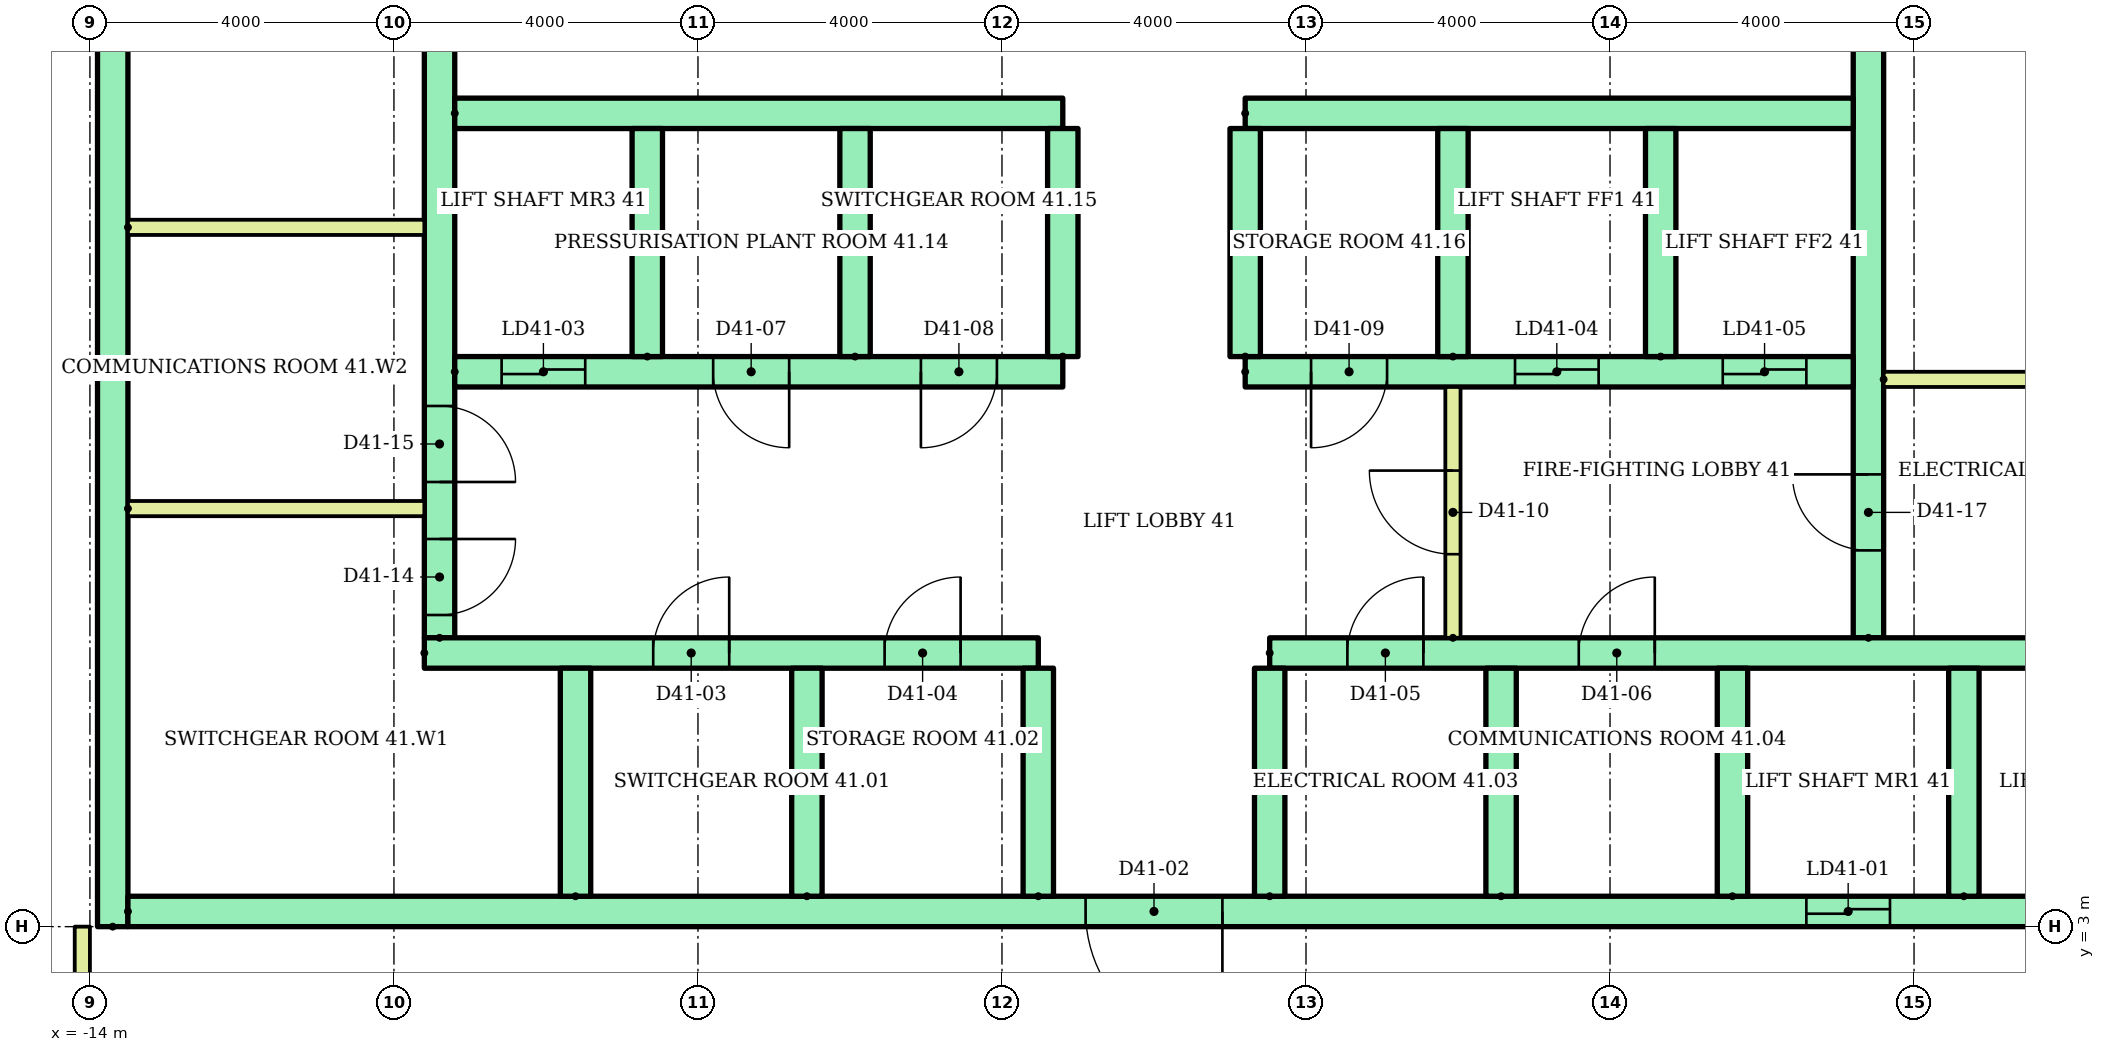
"""IFC4 building model, lengths in metres.
Left out: names, types, materials, properties, quantities, classifications, styles, units other than length and angle.
Written with IfcOpenShell. Run it as: python <this file> out.ifc"""

import sys

from ifc_helpers import new_model, si_unit, direction, frame, frame_2d, origin, place, context, subcontext, project, spatial, rectangle, extrude, element, fill, save


model = new_model("IFC4")
c1 = context("Model", 3, precision=1e-05, world=origin(), true_north=direction((0.0, 1.0)))
c2 = subcontext(c1, "Body", "Model", "MODEL_VIEW")
j1 = project(units=[si_unit("LENGTHUNIT", "METRE"), si_unit("PLANEANGLEUNIT", "RADIAN")], contexts=[c1])
p1 = place(None, origin())
s1 = spatial("IfcSite", under=j1, at=p1, CompositionType="ELEMENT")
p2 = place(p1, origin())
s2 = spatial("IfcBuilding", under=s1, at=p2, CompositionType="ELEMENT")
p3 = place(p2, frame((0.0, 0.0, 161.4)))
s3 = spatial("IfcBuildingStorey", under=s2, at=p3, CompositionType="ELEMENT", Elevation=161.4)
p4 = place(p3, frame((-13.7, 3.0, 0.0), z_axis=(0.0, 0.0, 1.0), x_axis=(0.0, 1.0, 0.0)))
e1 = element("IfcWall", 1, at=p4, inside=s3, PredefinedType="SHEAR", context=c2, shape_type="SweptSolid", body=[
    extrude(rectangle(XDim=17.0, YDim=0.4, at=frame_2d((8.5, 0.0))), origin(), (0.0, 0.0, 1.0), 3.62),
])
p5 = place(p3, frame((-9.4, 6.8, 0.0), z_axis=(0.0, 0.0, 1.0), x_axis=(0.0, 1.0, 0.0)))
e2 = element("IfcWall", 2, at=p5, inside=s3, PredefinedType="SHEAR", context=c2, shape_type="SweptSolid", body=[
    extrude(rectangle(XDim=12.7, YDim=0.4, at=frame_2d((6.35, 0.0))), origin(), (0.0, 0.0, 1.0), 3.62),
])
p6 = place(p5, frame((0.3, 0.0, 0.0)))
e3 = element("IfcOpeningElement", 3, at=p6, cuts=e2, PredefinedType="OPENING", context=c2, shape_type="SweptSolid", body=[
    extrude(rectangle(XDim=1.0, YDim=2.1, at=frame_2d((0.5, 1.05))), frame((0.0, 0.21, 0.0), z_axis=(0.0, -1.0, 0.0), x_axis=(1.0, 0.0, 0.0)), (0.0, 0.0, 1.0), 0.42),
])
p7 = place(p5, frame((2.05, 0.0, 0.0)))
e4 = element("IfcOpeningElement", 4, at=p7, cuts=e2, PredefinedType="OPENING", context=c2, shape_type="SweptSolid", body=[
    extrude(rectangle(XDim=1.0, YDim=2.1, at=frame_2d((0.5, 1.05))), frame((0.0, 0.21, 0.0), z_axis=(0.0, -1.0, 0.0), x_axis=(1.0, 0.0, 0.0)), (0.0, 0.0, 1.0), 0.42),
])
p8 = place(p5, frame((7.925, 0.0, 0.0)))
e5 = element("IfcOpeningElement", 5, at=p8, cuts=e2, PredefinedType="OPENING", context=c2, shape_type="SweptSolid", body=[
    extrude(rectangle(XDim=1.0, YDim=2.1, at=frame_2d((0.5, 1.05))), frame((0.0, 0.21, 0.0), z_axis=(0.0, -1.0, 0.0), x_axis=(1.0, 0.0, 0.0)), (0.0, 0.0, 1.0), 0.42),
])
p9 = place(p3, frame((9.4, 6.8, 0.0), z_axis=(0.0, 0.0, 1.0), x_axis=(0.0, 1.0, 0.0)))
e6 = element("IfcWall", 6, at=p9, inside=s3, PredefinedType="SHEAR", context=c2, shape_type="SweptSolid", body=[
    extrude(rectangle(XDim=12.7, YDim=0.4, at=frame_2d((6.35, 0.0))), origin(), (0.0, 0.0, 1.0), 3.62),
])
p10 = place(p9, frame((1.15, 0.0, 0.0)))
e7 = element("IfcOpeningElement", 7, at=p10, cuts=e6, PredefinedType="OPENING", context=c2, shape_type="SweptSolid", body=[
    extrude(rectangle(XDim=1.0, YDim=2.1, at=frame_2d((0.5, 1.05))), frame((0.0, 0.21, 0.0), z_axis=(0.0, -1.0, 0.0), x_axis=(1.0, 0.0, 0.0)), (0.0, 0.0, 1.0), 0.42),
])
p11 = place(p9, frame((7.925, 0.0, 0.0)))
e8 = element("IfcOpeningElement", 8, at=p11, cuts=e6, PredefinedType="OPENING", context=c2, shape_type="SweptSolid", body=[
    extrude(rectangle(XDim=1.0, YDim=2.1, at=frame_2d((0.5, 1.05))), frame((0.0, 0.21, 0.0), z_axis=(0.0, -1.0, 0.0), x_axis=(1.0, 0.0, 0.0)), (0.0, 0.0, 1.0), 0.42),
])
p12 = place(p3, frame((-13.5, 3.2, 0.0)))
e9 = element("IfcWall", 9, at=p12, inside=s3, PredefinedType="SHEAR", context=c2, shape_type="SweptSolid", body=[
    extrude(rectangle(XDim=27.0, YDim=0.4, at=frame_2d((13.5, 0.0))), origin(), (0.0, 0.0, 1.0), 3.62),
])
p13 = place(p12, frame((22.083, 0.0, 0.0)))
e10 = element("IfcOpeningElement", 10, at=p13, cuts=e9, PredefinedType="OPENING", context=c2, shape_type="SweptSolid", body=[
    extrude(rectangle(XDim=1.1, YDim=2.1, at=frame_2d((0.55, 1.05))), frame((0.0, 0.21, 0.0), z_axis=(0.0, -1.0, 0.0), x_axis=(1.0, 0.0, 0.0)), (0.0, 0.0, 1.0), 0.42),
])
p14 = place(p12, frame((25.128, 0.0, 0.0)))
e11 = element("IfcOpeningElement", 11, at=p14, cuts=e9, PredefinedType="OPENING", context=c2, shape_type="SweptSolid", body=[
    extrude(rectangle(XDim=1.1, YDim=2.1, at=frame_2d((0.55, 1.05))), frame((0.0, 0.21, 0.0), z_axis=(0.0, -1.0, 0.0), x_axis=(1.0, 0.0, 0.0)), (0.0, 0.0, 1.0), 0.42),
])
p15 = place(p12, frame((12.6, 0.0, 0.0)))
e12 = element("IfcOpeningElement", 12, at=p15, cuts=e9, PredefinedType="OPENING", context=c2, shape_type="SweptSolid", body=[
    extrude(rectangle(XDim=1.8, YDim=2.1, at=frame_2d((0.9, 1.05))), frame((0.0, 0.21, 0.0), z_axis=(0.0, -1.0, 0.0), x_axis=(1.0, 0.0, 0.0)), (0.0, 0.0, 1.0), 0.42),
])
p16 = place(p3, frame((-9.6, 6.6, 0.0)))
e13 = element("IfcWall", 13, at=p16, inside=s3, PredefinedType="SHEAR", context=c2, shape_type="SweptSolid", body=[
    extrude(rectangle(XDim=8.078, YDim=0.4, at=frame_2d((4.039, 0.0))), origin(), (0.0, 0.0, 1.0), 3.62),
])
p17 = place(p16, frame((3.011, 0.0, 0.0)))
e14 = element("IfcOpeningElement", 14, at=p17, cuts=e13, PredefinedType="OPENING", context=c2, shape_type="SweptSolid", body=[
    extrude(rectangle(XDim=1.0, YDim=2.1, at=frame_2d((0.5, 1.05))), frame((0.0, 0.21, 0.0), z_axis=(0.0, -1.0, 0.0), x_axis=(1.0, 0.0, 0.0)), (0.0, 0.0, 1.0), 0.42),
])
p18 = place(p16, frame((6.056, 0.0, 0.0)))
e15 = element("IfcOpeningElement", 15, at=p18, cuts=e13, PredefinedType="OPENING", context=c2, shape_type="SweptSolid", body=[
    extrude(rectangle(XDim=1.0, YDim=2.1, at=frame_2d((0.5, 1.05))), frame((0.0, 0.21, 0.0), z_axis=(0.0, -1.0, 0.0), x_axis=(1.0, 0.0, 0.0)), (0.0, 0.0, 1.0), 0.42),
])
p19 = place(p3, frame((1.522, 6.6, 0.0)))
e16 = element("IfcWall", 16, at=p19, inside=s3, PredefinedType="SHEAR", context=c2, shape_type="SweptSolid", body=[
    extrude(rectangle(XDim=11.978, YDim=0.4, at=frame_2d((5.989, 0.0))), origin(), (0.0, 0.0, 1.0), 3.62),
])
p20 = place(p19, frame((1.022, 0.0, 0.0)))
e17 = element("IfcOpeningElement", 17, at=p20, cuts=e16, PredefinedType="OPENING", context=c2, shape_type="SweptSolid", body=[
    extrude(rectangle(XDim=1.0, YDim=2.1, at=frame_2d((0.5, 1.05))), frame((0.0, 0.21, 0.0), z_axis=(0.0, -1.0, 0.0), x_axis=(1.0, 0.0, 0.0)), (0.0, 0.0, 1.0), 0.42),
])
p21 = place(p19, frame((4.067, 0.0, 0.0)))
e18 = element("IfcOpeningElement", 18, at=p21, cuts=e16, PredefinedType="OPENING", context=c2, shape_type="SweptSolid", body=[
    extrude(rectangle(XDim=1.0, YDim=2.1, at=frame_2d((0.5, 1.05))), frame((0.0, 0.21, 0.0), z_axis=(0.0, -1.0, 0.0), x_axis=(1.0, 0.0, 0.0)), (0.0, 0.0, 1.0), 0.42),
])
for number, where, z_axis, x_axis in (
    (19, (-7.611, 3.4, 0.0), (0.0, 0.0, 1.0), (0.0, 1.0, 0.0)),
    (20, (-4.567, 3.4, 0.0), (0.0, 0.0, 1.0), (0.0, 1.0, 0.0)),
    (21, (-1.522, 3.4, 0.0), (0.0, 0.0, 1.0), (0.0, 1.0, 0.0)),
    (22, (1.522, 3.4, 0.0), (0.0, 0.0, 1.0), (0.0, 1.0, 0.0)),
    (23, (4.567, 3.4, 0.0), (0.0, 0.0, 1.0), (0.0, 1.0, 0.0)),
    (24, (7.611, 3.4, 0.0), (0.0, 0.0, 1.0), (0.0, 1.0, 0.0)),
    (25, (10.656, 3.4, 0.0), (0.0, 0.0, 1.0), (0.0, 1.0, 0.0)),
):
    element("IfcWall", number, at=place(p3, frame(where, z_axis=z_axis, x_axis=x_axis)), inside=s3, PredefinedType="SHEAR", context=c2, shape_type="SweptSolid", body=[
        extrude(rectangle(XDim=3.0, YDim=0.4, at=frame_2d((1.5, 0.0))), origin(), (0.0, 0.0, 1.0), 3.62),
    ])
p22 = place(p3, frame((-9.2, 10.3, 0.0)))
e26 = element("IfcWall", 26, at=p22, inside=s3, PredefinedType="SHEAR", context=c2, shape_type="SweptSolid", body=[
    extrude(rectangle(XDim=8.0, YDim=0.4, at=frame_2d((4.0, 0.0))), origin(), (0.0, 0.0, 1.0), 3.62),
])
p23 = place(p22, frame((0.617, 0.0, 0.0)))
e27 = element("IfcOpeningElement", 27, at=p23, cuts=e26, PredefinedType="OPENING", context=c2, shape_type="SweptSolid", body=[
    extrude(rectangle(XDim=1.1, YDim=2.1, at=frame_2d((0.55, 1.05))), frame((0.0, 0.21, 0.0), z_axis=(0.0, -1.0, 0.0), x_axis=(1.0, 0.0, 0.0)), (0.0, 0.0, 1.0), 0.42),
])
p24 = place(p22, frame((3.4, 0.0, 0.0)))
e28 = element("IfcOpeningElement", 28, at=p24, cuts=e26, PredefinedType="OPENING", context=c2, shape_type="SweptSolid", body=[
    extrude(rectangle(XDim=1.0, YDim=2.1, at=frame_2d((0.5, 1.05))), frame((0.0, 0.21, 0.0), z_axis=(0.0, -1.0, 0.0), x_axis=(1.0, 0.0, 0.0)), (0.0, 0.0, 1.0), 0.42),
])
p25 = place(p22, frame((6.133, 0.0, 0.0)))
e29 = element("IfcOpeningElement", 29, at=p25, cuts=e26, PredefinedType="OPENING", context=c2, shape_type="SweptSolid", body=[
    extrude(rectangle(XDim=1.0, YDim=2.1, at=frame_2d((0.5, 1.05))), frame((0.0, 0.21, 0.0), z_axis=(0.0, -1.0, 0.0), x_axis=(1.0, 0.0, 0.0)), (0.0, 0.0, 1.0), 0.42),
])
p26 = place(p3, frame((-9.2, 13.7, 0.0)))
e30 = element("IfcWall", 30, at=p26, inside=s3, PredefinedType="SHEAR", context=c2, shape_type="SweptSolid", body=[
    extrude(rectangle(XDim=8.0, YDim=0.4, at=frame_2d((4.0, 0.0))), origin(), (0.0, 0.0, 1.0), 3.62),
])
p27 = place(p3, frame((1.2, 10.3, 0.0)))
e31 = element("IfcWall", 31, at=p27, inside=s3, PredefinedType="SHEAR", context=c2, shape_type="SweptSolid", body=[
    extrude(rectangle(XDim=8.0, YDim=0.4, at=frame_2d((4.0, 0.0))), origin(), (0.0, 0.0, 1.0), 3.62),
])
p28 = place(p27, frame((3.55, 0.0, 0.0)))
e32 = element("IfcOpeningElement", 32, at=p28, cuts=e31, PredefinedType="OPENING", context=c2, shape_type="SweptSolid", body=[
    extrude(rectangle(XDim=1.1, YDim=2.1, at=frame_2d((0.55, 1.05))), frame((0.0, 0.21, 0.0), z_axis=(0.0, -1.0, 0.0), x_axis=(1.0, 0.0, 0.0)), (0.0, 0.0, 1.0), 0.42),
])
p29 = place(p27, frame((6.283, 0.0, 0.0)))
e33 = element("IfcOpeningElement", 33, at=p29, cuts=e31, PredefinedType="OPENING", context=c2, shape_type="SweptSolid", body=[
    extrude(rectangle(XDim=1.1, YDim=2.1, at=frame_2d((0.55, 1.05))), frame((0.0, 0.21, 0.0), z_axis=(0.0, -1.0, 0.0), x_axis=(1.0, 0.0, 0.0)), (0.0, 0.0, 1.0), 0.42),
])
p30 = place(p27, frame((0.867, 0.0, 0.0)))
e34 = element("IfcOpeningElement", 34, at=p30, cuts=e31, PredefinedType="OPENING", context=c2, shape_type="SweptSolid", body=[
    extrude(rectangle(XDim=1.0, YDim=2.1, at=frame_2d((0.5, 1.05))), frame((0.0, 0.21, 0.0), z_axis=(0.0, -1.0, 0.0), x_axis=(1.0, 0.0, 0.0)), (0.0, 0.0, 1.0), 0.42),
])
p31 = place(p3, frame((1.2, 13.7, 0.0)))
e35 = element("IfcWall", 35, at=p31, inside=s3, PredefinedType="SHEAR", context=c2, shape_type="SweptSolid", body=[
    extrude(rectangle(XDim=8.0, YDim=0.4, at=frame_2d((4.0, 0.0))), origin(), (0.0, 0.0, 1.0), 3.62),
])
for number, where, z_axis, x_axis in (
    (36, (-6.667, 10.5, 0.0), (0.0, 0.0, 1.0), (0.0, 1.0, 0.0)),
    (37, (-3.933, 10.5, 0.0), (0.0, 0.0, 1.0), (0.0, 1.0, 0.0)),
    (38, (-1.2, 10.5, 0.0), (0.0, 0.0, 1.0), (0.0, 1.0, 0.0)),
    (39, (1.2, 10.5, 0.0), (0.0, 0.0, 1.0), (0.0, 1.0, 0.0)),
    (40, (3.933, 10.5, 0.0), (0.0, 0.0, 1.0), (0.0, 1.0, 0.0)),
    (41, (6.667, 10.5, 0.0), (0.0, 0.0, 1.0), (0.0, 1.0, 0.0)),
):
    element("IfcWall", number, at=place(p3, frame(where, z_axis=z_axis, x_axis=x_axis)), inside=s3, PredefinedType="SHEAR", context=c2, shape_type="SweptSolid", body=[
        extrude(rectangle(XDim=3.0, YDim=0.4, at=frame_2d((1.5, 0.0))), origin(), (0.0, 0.0, 1.0), 3.62),
    ])
p32 = place(p3, frame((3.933, 6.8, 0.0), z_axis=(0.0, 0.0, 1.0), x_axis=(0.0, 1.0, 0.0)))
e42 = element("IfcWall", 42, at=p32, inside=s3, PredefinedType="PARTITIONING", context=c2, shape_type="SweptSolid", body=[
    extrude(rectangle(XDim=3.3, YDim=0.2, at=frame_2d((1.65, 0.0))), origin(), (0.0, 0.0, 1.0), 3.62),
])
p33 = place(p32, frame((1.1, 0.0, 0.0)))
e43 = element("IfcOpeningElement", 43, at=p33, cuts=e42, PredefinedType="OPENING", context=c2, shape_type="SweptSolid", body=[
    extrude(rectangle(XDim=1.1, YDim=2.1, at=frame_2d((0.55, 1.05))), frame((0.0, 0.11, 0.0), z_axis=(0.0, -1.0, 0.0), x_axis=(1.0, 0.0, 0.0)), (0.0, 0.0, 1.0), 0.22),
])
for number, where in (
    (44, (-13.5, 8.5, 0.0)),
    (45, (-13.5, 12.2, 0.0)),
    (46, (9.6, 10.2, 0.0)),
):
    element("IfcWall", number, at=place(p3, frame(where)), inside=s3, PredefinedType="PARTITIONING", context=c2, shape_type="SweptSolid", body=[
        extrude(rectangle(XDim=3.9, YDim=0.2, at=frame_2d((1.95, 0.0))), origin(), (0.0, 0.0, 1.0), 3.62),
    ])
p34 = place(p3, frame((-14.1, 1.5, 0.0), z_axis=(0.0, 0.0, 1.0), x_axis=(0.0, 1.0, 0.0)))
e47 = element("IfcWall", 47, at=p34, inside=s3, PredefinedType="PARTITIONING", context=c2, shape_type="SweptSolid", body=[
    extrude(rectangle(XDim=1.5, YDim=0.2, at=frame_2d((0.75, 0.0))), origin(), (0.0, 0.0, 1.0), 3.62),
])
p35 = place(p13, origin())
e48 = element("IfcDoor", 48, at=p35, inside=s3, OperationType="SLIDING_TO_LEFT", PredefinedType="DOOR", context=c2, shape_type="SweptSolid", body=[
    extrude(rectangle(XDim=1.1, YDim=2.1, at=frame_2d((0.55, 1.05))), frame((0.0, 0.025, 0.0), z_axis=(0.0, -1.0, 0.0), x_axis=(1.0, 0.0, 0.0)), (0.0, 0.0, 1.0), 0.05),
])
fill(e10, e48)
p36 = place(p15, frame((1.8, 0.0, 0.0), z_axis=(0.0, 0.0, 1.0), x_axis=(-1.0, 0.0, 0.0)))
e49 = element("IfcDoor", 49, at=p36, inside=s3, OperationType="DOUBLE_DOOR_SINGLE_SWING", PredefinedType="DOOR", context=c2, shape_type="SweptSolid", body=[
    extrude(rectangle(XDim=1.8, YDim=2.1, at=frame_2d((0.9, 1.05))), frame((0.0, 0.025, 0.0), z_axis=(0.0, -1.0, 0.0), x_axis=(1.0, 0.0, 0.0)), (0.0, 0.0, 1.0), 0.05),
])
fill(e12, e49)
p37 = place(p17, origin())
e50 = element("IfcDoor", 50, at=p37, inside=s3, OperationType="SINGLE_SWING_RIGHT", PredefinedType="DOOR", context=c2, shape_type="SweptSolid", body=[
    extrude(rectangle(XDim=1.0, YDim=2.1, at=frame_2d((0.5, 1.05))), frame((0.0, 0.025, 0.0), z_axis=(0.0, -1.0, 0.0), x_axis=(1.0, 0.0, 0.0)), (0.0, 0.0, 1.0), 0.05),
])
fill(e14, e50)
p38 = place(p18, origin())
e51 = element("IfcDoor", 51, at=p38, inside=s3, OperationType="SINGLE_SWING_RIGHT", PredefinedType="DOOR", context=c2, shape_type="SweptSolid", body=[
    extrude(rectangle(XDim=1.0, YDim=2.1, at=frame_2d((0.5, 1.05))), frame((0.0, 0.025, 0.0), z_axis=(0.0, -1.0, 0.0), x_axis=(1.0, 0.0, 0.0)), (0.0, 0.0, 1.0), 0.05),
])
fill(e15, e51)
p39 = place(p20, origin())
e52 = element("IfcDoor", 52, at=p39, inside=s3, OperationType="SINGLE_SWING_RIGHT", PredefinedType="DOOR", context=c2, shape_type="SweptSolid", body=[
    extrude(rectangle(XDim=1.0, YDim=2.1, at=frame_2d((0.5, 1.05))), frame((0.0, 0.025, 0.0), z_axis=(0.0, -1.0, 0.0), x_axis=(1.0, 0.0, 0.0)), (0.0, 0.0, 1.0), 0.05),
])
fill(e17, e52)
p40 = place(p21, origin())
e53 = element("IfcDoor", 53, at=p40, inside=s3, OperationType="SINGLE_SWING_RIGHT", PredefinedType="DOOR", context=c2, shape_type="SweptSolid", body=[
    extrude(rectangle(XDim=1.0, YDim=2.1, at=frame_2d((0.5, 1.05))), frame((0.0, 0.025, 0.0), z_axis=(0.0, -1.0, 0.0), x_axis=(1.0, 0.0, 0.0)), (0.0, 0.0, 1.0), 0.05),
])
fill(e18, e53)
p41 = place(p23, origin())
e54 = element("IfcDoor", 54, at=p41, inside=s3, OperationType="SLIDING_TO_LEFT", PredefinedType="DOOR", context=c2, shape_type="SweptSolid", body=[
    extrude(rectangle(XDim=1.1, YDim=2.1, at=frame_2d((0.55, 1.05))), frame((0.0, 0.025, 0.0), z_axis=(0.0, -1.0, 0.0), x_axis=(1.0, 0.0, 0.0)), (0.0, 0.0, 1.0), 0.05),
])
fill(e27, e54)
p42 = place(p28, origin())
e55 = element("IfcDoor", 55, at=p42, inside=s3, OperationType="SLIDING_TO_LEFT", PredefinedType="DOOR", context=c2, shape_type="SweptSolid", body=[
    extrude(rectangle(XDim=1.1, YDim=2.1, at=frame_2d((0.55, 1.05))), frame((0.0, 0.025, 0.0), z_axis=(0.0, -1.0, 0.0), x_axis=(1.0, 0.0, 0.0)), (0.0, 0.0, 1.0), 0.05),
])
fill(e32, e55)
p43 = place(p29, origin())
e56 = element("IfcDoor", 56, at=p43, inside=s3, OperationType="SLIDING_TO_LEFT", PredefinedType="DOOR", context=c2, shape_type="SweptSolid", body=[
    extrude(rectangle(XDim=1.1, YDim=2.1, at=frame_2d((0.55, 1.05))), frame((0.0, 0.025, 0.0), z_axis=(0.0, -1.0, 0.0), x_axis=(1.0, 0.0, 0.0)), (0.0, 0.0, 1.0), 0.05),
])
fill(e33, e56)
p44 = place(p24, frame((1.0, 0.0, 0.0), z_axis=(0.0, 0.0, 1.0), x_axis=(-1.0, 0.0, 0.0)))
e57 = element("IfcDoor", 57, at=p44, inside=s3, OperationType="SINGLE_SWING_RIGHT", PredefinedType="DOOR", context=c2, shape_type="SweptSolid", body=[
    extrude(rectangle(XDim=1.0, YDim=2.1, at=frame_2d((0.5, 1.05))), frame((0.0, 0.025, 0.0), z_axis=(0.0, -1.0, 0.0), x_axis=(1.0, 0.0, 0.0)), (0.0, 0.0, 1.0), 0.05),
])
fill(e28, e57)
p45 = place(p25, frame((1.0, 0.0, 0.0), z_axis=(0.0, 0.0, 1.0), x_axis=(-1.0, 0.0, 0.0)))
e58 = element("IfcDoor", 58, at=p45, inside=s3, OperationType="SINGLE_SWING_LEFT", PredefinedType="DOOR", context=c2, shape_type="SweptSolid", body=[
    extrude(rectangle(XDim=1.0, YDim=2.1, at=frame_2d((0.5, 1.05))), frame((0.0, 0.025, 0.0), z_axis=(0.0, -1.0, 0.0), x_axis=(1.0, 0.0, 0.0)), (0.0, 0.0, 1.0), 0.05),
])
fill(e29, e58)
p46 = place(p30, frame((1.0, 0.0, 0.0), z_axis=(0.0, 0.0, 1.0), x_axis=(-1.0, 0.0, 0.0)))
e59 = element("IfcDoor", 59, at=p46, inside=s3, OperationType="SINGLE_SWING_LEFT", PredefinedType="DOOR", context=c2, shape_type="SweptSolid", body=[
    extrude(rectangle(XDim=1.0, YDim=2.1, at=frame_2d((0.5, 1.05))), frame((0.0, 0.025, 0.0), z_axis=(0.0, -1.0, 0.0), x_axis=(1.0, 0.0, 0.0)), (0.0, 0.0, 1.0), 0.05),
])
fill(e34, e59)
p47 = place(p33, origin())
e60 = element("IfcDoor", 60, at=p47, inside=s3, OperationType="SINGLE_SWING_RIGHT", PredefinedType="DOOR", context=c2, shape_type="SweptSolid", body=[
    extrude(rectangle(XDim=1.1, YDim=2.1, at=frame_2d((0.55, 1.05))), frame((0.0, 0.025, 0.0), z_axis=(0.0, -1.0, 0.0), x_axis=(1.0, 0.0, 0.0)), (0.0, 0.0, 1.0), 0.05),
])
fill(e43, e60)
p48 = place(p6, frame((1.0, 0.0, 0.0), z_axis=(0.0, 0.0, 1.0), x_axis=(-1.0, 0.0, 0.0)))
e61 = element("IfcDoor", 61, at=p48, inside=s3, OperationType="SINGLE_SWING_RIGHT", PredefinedType="DOOR", context=c2, shape_type="SweptSolid", body=[
    extrude(rectangle(XDim=1.0, YDim=2.1, at=frame_2d((0.5, 1.05))), frame((0.0, 0.025, 0.0), z_axis=(0.0, -1.0, 0.0), x_axis=(1.0, 0.0, 0.0)), (0.0, 0.0, 1.0), 0.05),
])
fill(e3, e61)
p49 = place(p7, frame((1.0, 0.0, 0.0), z_axis=(0.0, 0.0, 1.0), x_axis=(-1.0, 0.0, 0.0)))
e62 = element("IfcDoor", 62, at=p49, inside=s3, OperationType="SINGLE_SWING_LEFT", PredefinedType="DOOR", context=c2, shape_type="SweptSolid", body=[
    extrude(rectangle(XDim=1.0, YDim=2.1, at=frame_2d((0.5, 1.05))), frame((0.0, 0.025, 0.0), z_axis=(0.0, -1.0, 0.0), x_axis=(1.0, 0.0, 0.0)), (0.0, 0.0, 1.0), 0.05),
])
fill(e4, e62)
p50 = place(p10, origin())
e63 = element("IfcDoor", 63, at=p50, inside=s3, OperationType="SINGLE_SWING_RIGHT", PredefinedType="DOOR", context=c2, shape_type="SweptSolid", body=[
    extrude(rectangle(XDim=1.0, YDim=2.1, at=frame_2d((0.5, 1.05))), frame((0.0, 0.025, 0.0), z_axis=(0.0, -1.0, 0.0), x_axis=(1.0, 0.0, 0.0)), (0.0, 0.0, 1.0), 0.05),
])
fill(e7, e63)
save(model, sys.argv[1])
